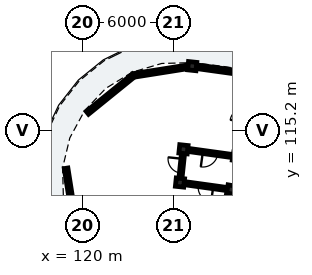
"""IFC4 building model, lengths in metres.
Left out: names, types, materials, properties, quantities, classifications, styles, units other than length and angle.
Written with IfcOpenShell. Run it as: python <this file> out.ifc"""

import sys

from ifc_helpers import new_model, si_unit, direction, frame, frame_2d, origin, origin_2d, place, context, subcontext, project, spatial, rectangle, extrude, element, fill, save


model = new_model("IFC4")
c1 = context("Model", 3, precision=1e-05, world=origin(), true_north=direction((0.0, 1.0)))
c2 = subcontext(c1, "Body", "Model", "MODEL_VIEW")
j1 = project(units=[si_unit("LENGTHUNIT", "METRE"), si_unit("PLANEANGLEUNIT", "RADIAN")], contexts=[c1])
p1 = place(None, origin())
s1 = spatial("IfcSite", under=j1, at=p1, CompositionType="ELEMENT")
p2 = place(p1, origin())
s2 = spatial("IfcBuilding", under=s1, at=p2, CompositionType="ELEMENT")
p3 = place(p2, frame((0.0, 0.0, 22.28)))
s3 = spatial("IfcBuildingStorey", under=s2, at=p3, CompositionType="ELEMENT", Elevation=22.28)
for number, where, z_axis, x_axis in (
    (1, (129.806, 111.297, 0.0), (0.0, 0.0, 1.0), (0.17, 0.985, 0.0)),
    (2, (130.179, 113.465, 0.0), (0.0, 0.0, 1.0), (0.17, 0.985, 0.0)),
    (3, (126.42, 111.766, 0.0), (0.0, 0.0, 1.0), (0.105, 0.995, 0.0)),
    (4, (126.65, 113.954, 0.0), (0.0, 0.0, 1.0), (0.105, 0.995, 0.0)),
    (5, (127.225, 119.424, 0.0), (0.0, 0.0, 1.0), (0.105, 0.995, 0.0)),
):
    element("IfcColumn", number, at=place(p3, frame(where, z_axis=z_axis, x_axis=x_axis)), inside=s3, PredefinedType="COLUMN", context=c2, shape_type="SweptSolid", body=[
        extrude(rectangle(XDim=0.55, YDim=0.55, at=origin_2d()), origin(), (0.0, 0.0, 1.0), 3.11),
    ])
p4 = place(p3, frame((130.955, 118.907, 0.0), z_axis=(0.0, 0.0, 1.0), x_axis=(-0.990539718913, 0.137226328578, 0.0)))
e6 = element("IfcWall", 6, at=p4, inside=s3, PredefinedType="SOLIDWALL", context=c2, shape_type="SweptSolid", body=[
    extrude(rectangle(XDim=3.521, YDim=0.24, at=frame_2d((1.76, 0.0))), origin(), (0.0, 0.0, 1.0), 2.355),
])
p5 = place(p4, frame((1.06, 0.0, 0.55)))
e7 = element("IfcOpeningElement", 7, at=p5, cuts=e6, PredefinedType="OPENING", context=c2, shape_type="SweptSolid", body=[
    extrude(rectangle(XDim=1.4, YDim=1.635, at=frame_2d((0.7, 0.817))), frame((0.0, 0.13, 0.0), z_axis=(0.0, -1.0, 0.0), x_axis=(1.0, 0.0, 0.0)), (0.0, 0.0, 1.0), 0.26),
])
p6 = place(p3, frame((119.538, 108.844, 0.0), z_axis=(0.0, 0.0, 1.0), x_axis=(-0.15648221771, 0.987680776132, 0.0)))
e8 = element("IfcWall", 8, at=p6, inside=s3, PredefinedType="SOLIDWALL", context=c2, shape_type="SweptSolid", body=[
    extrude(rectangle(XDim=3.908, YDim=0.24, at=frame_2d((1.954, 0.0))), origin(), (0.0, 0.0, 1.0), 2.355),
])
p7 = place(p6, frame((1.029, 0.0, 0.4)))
e9 = element("IfcOpeningElement", 9, at=p7, cuts=e8, PredefinedType="OPENING", context=c2, shape_type="SweptSolid", body=[
    extrude(rectangle(XDim=1.85, YDim=1.72, at=frame_2d((0.925, 0.86))), frame((0.0, 0.13, 0.0), z_axis=(0.0, -1.0, 0.0), x_axis=(1.0, 0.0, 0.0)), (0.0, 0.0, 1.0), 0.26),
])
p8 = place(p3, frame((120.327, 116.353, 0.0), z_axis=(0.0, 0.0, 1.0), x_axis=(0.777137204109, 0.629331205321, 0.0)))
e10 = element("IfcWall", 10, at=p8, inside=s3, PredefinedType="SOLIDWALL", context=c2, shape_type="SweptSolid", body=[
    extrude(rectangle(XDim=3.908, YDim=0.24, at=frame_2d((1.954, 0.0))), origin(), (0.0, 0.0, 1.0), 2.355),
])
p9 = place(p3, frame((123.365, 118.812, 0.0), z_axis=(0.0, 0.0, 1.0), x_axis=(0.987690429048, 0.156421278498, 0.0)))
e11 = element("IfcWall", 11, at=p9, inside=s3, PredefinedType="SOLIDWALL", context=c2, shape_type="SweptSolid", body=[
    extrude(rectangle(XDim=3.908, YDim=0.24, at=frame_2d((1.954, 0.0))), origin(), (0.0, 0.0, 1.0), 2.355),
])
p10 = place(p9, frame((1.029, 0.0, 0.4)))
e12 = element("IfcOpeningElement", 12, at=p10, cuts=e11, PredefinedType="OPENING", context=c2, shape_type="SweptSolid", body=[
    extrude(rectangle(XDim=1.85, YDim=1.72, at=frame_2d((0.925, 0.86))), frame((0.0, 0.13, 0.0), z_axis=(0.0, -1.0, 0.0), x_axis=(1.0, 0.0, 0.0)), (0.0, 0.0, 1.0), 0.26),
])
p11 = place(p3, frame((128.617, 104.398, 0.0), z_axis=(0.0, 0.0, 1.0), x_axis=(0.169825160084, 0.985474208187, 0.0)))
e13 = element("IfcWall", 13, at=p11, inside=s3, PredefinedType="PARTITIONING", context=c2, shape_type="SweptSolid", body=[
    extrude(rectangle(XDim=6.6, YDim=0.185, at=frame_2d((3.3, 0.0))), origin(), (0.0, 0.0, 1.0), 2.37),
])
p12 = place(p3, frame((129.833, 113.513, 0.0), z_axis=(0.0, 0.0, 1.0), x_axis=(-0.990544162976, 0.137194246211, 0.0)))
e14 = element("IfcWall", 14, at=p12, inside=s3, PredefinedType="PARTITIONING", context=c2, shape_type="SweptSolid", body=[
    extrude(rectangle(XDim=2.863, YDim=0.205, at=frame_2d((1.432, 0.0))), origin(), (0.0, 0.0, 1.0), 2.37),
])
p13 = place(p12, frame((0.937, 0.0, 0.0)))
e15 = element("IfcOpeningElement", 15, at=p13, cuts=e14, PredefinedType="OPENING", context=c2, shape_type="SweptSolid", body=[
    extrude(rectangle(XDim=0.99, YDim=2.16, at=frame_2d((0.495, 1.08))), frame((0.0, 0.113, 0.0), z_axis=(0.0, -1.0, 0.0), x_axis=(1.0, 0.0, 0.0)), (0.0, 0.0, 1.0), 0.225),
])
p14 = place(p3, frame((129.459, 111.345, 0.0), z_axis=(0.0, 0.0, 1.0), x_axis=(-0.990535404475, 0.137257467855, 0.0)))
e16 = element("IfcWall", 16, at=p14, inside=s3, PredefinedType="PARTITIONING", context=c2, shape_type="SweptSolid", body=[
    extrude(rectangle(XDim=2.718, YDim=0.205, at=frame_2d((1.359, 0.0))), origin(), (0.0, 0.0, 1.0), 2.37),
])
p15 = place(p14, frame((0.864, 0.0, 0.0)))
e17 = element("IfcOpeningElement", 17, at=p15, cuts=e16, PredefinedType="OPENING", context=c2, shape_type="SweptSolid", body=[
    extrude(rectangle(XDim=0.99, YDim=2.16, at=frame_2d((0.495, 1.08))), frame((0.0, 0.113, 0.0), z_axis=(0.0, -1.0, 0.0), x_axis=(1.0, 0.0, 0.0)), (0.0, 0.0, 1.0), 0.225),
])
p16 = place(p3, frame((126.425, 111.816, 0.0), z_axis=(0.0, 0.0, 1.0), x_axis=(0.104509292252, 0.994523910136, 0.0)))
e18 = element("IfcWall", 18, at=p16, inside=s3, PredefinedType="PARTITIONING", context=c2, shape_type="SweptSolid", body=[
    extrude(rectangle(XDim=2.1, YDim=0.205, at=frame_2d((1.05, 0.0))), origin(), (0.0, 0.0, 1.0), 2.37),
])
p17 = place(p16, frame((0.57, 0.0, 0.0)))
e19 = element("IfcOpeningElement", 19, at=p17, cuts=e18, PredefinedType="OPENING", context=c2, shape_type="SweptSolid", body=[
    extrude(rectangle(XDim=0.95, YDim=2.13, at=frame_2d((0.475, 1.065))), frame((0.0, 0.113, 0.0), z_axis=(0.0, -1.0, 0.0), x_axis=(1.0, 0.0, 0.0)), (0.0, 0.0, 1.0), 0.225),
])
p18 = place(p5, origin())
e20 = element("IfcWindow", 20, at=p18, inside=s3, PartitioningType="SINGLE_PANEL", PredefinedType="WINDOW", context=c2, shape_type="SweptSolid", body=[
    extrude(rectangle(XDim=1.4, YDim=1.635, at=frame_2d((0.7, 0.817))), frame((0.0, 0.03, 0.0), z_axis=(0.0, -1.0, 0.0), x_axis=(1.0, 0.0, 0.0)), (0.0, 0.0, 1.0), 0.06),
])
fill(e7, e20)
p19 = place(p7, origin())
e21 = element("IfcWindow", 21, at=p19, inside=s3, PartitioningType="SINGLE_PANEL", PredefinedType="WINDOW", context=c2, shape_type="SweptSolid", body=[
    extrude(rectangle(XDim=1.85, YDim=1.72, at=frame_2d((0.925, 0.86))), frame((0.0, 0.03, 0.0), z_axis=(0.0, -1.0, 0.0), x_axis=(1.0, 0.0, 0.0)), (0.0, 0.0, 1.0), 0.06),
])
fill(e9, e21)
p20 = place(p10, origin())
e22 = element("IfcWindow", 22, at=p20, inside=s3, PartitioningType="SINGLE_PANEL", PredefinedType="WINDOW", context=c2, shape_type="SweptSolid", body=[
    extrude(rectangle(XDim=1.85, YDim=1.72, at=frame_2d((0.925, 0.86))), frame((0.0, 0.03, 0.0), z_axis=(0.0, -1.0, 0.0), x_axis=(1.0, 0.0, 0.0)), (0.0, 0.0, 1.0), 0.06),
])
fill(e12, e22)
p21 = place(p13, origin())
e23 = element("IfcDoor", 23, at=p21, inside=s3, OperationType="SINGLE_SWING_RIGHT", PredefinedType="DOOR", context=c2, shape_type="SweptSolid", body=[
    extrude(rectangle(XDim=0.99, YDim=2.16, at=frame_2d((0.495, 1.08))), frame((0.0, 0.025, 0.0), z_axis=(0.0, -1.0, 0.0), x_axis=(1.0, 0.0, 0.0)), (0.0, 0.0, 1.0), 0.05),
])
fill(e15, e23)
p22 = place(p15, origin())
e24 = element("IfcDoor", 24, at=p22, inside=s3, OperationType="SINGLE_SWING_LEFT", PredefinedType="DOOR", context=c2, shape_type="SweptSolid", body=[
    extrude(rectangle(XDim=0.99, YDim=2.16, at=frame_2d((0.495, 1.08))), frame((0.0, 0.025, 0.0), z_axis=(0.0, -1.0, 0.0), x_axis=(1.0, 0.0, 0.0)), (0.0, 0.0, 1.0), 0.05),
])
fill(e17, e24)
p23 = place(p17, origin())
e25 = element("IfcDoor", 25, at=p23, inside=s3, OperationType="SINGLE_SWING_RIGHT", PredefinedType="DOOR", context=c2, shape_type="SweptSolid", body=[
    extrude(rectangle(XDim=0.95, YDim=2.13, at=frame_2d((0.475, 1.065))), frame((0.0, 0.025, 0.0), z_axis=(0.0, -1.0, 0.0), x_axis=(1.0, 0.0, 0.0)), (0.0, 0.0, 1.0), 0.05),
])
fill(e19, e25)
save(model, sys.argv[1])
